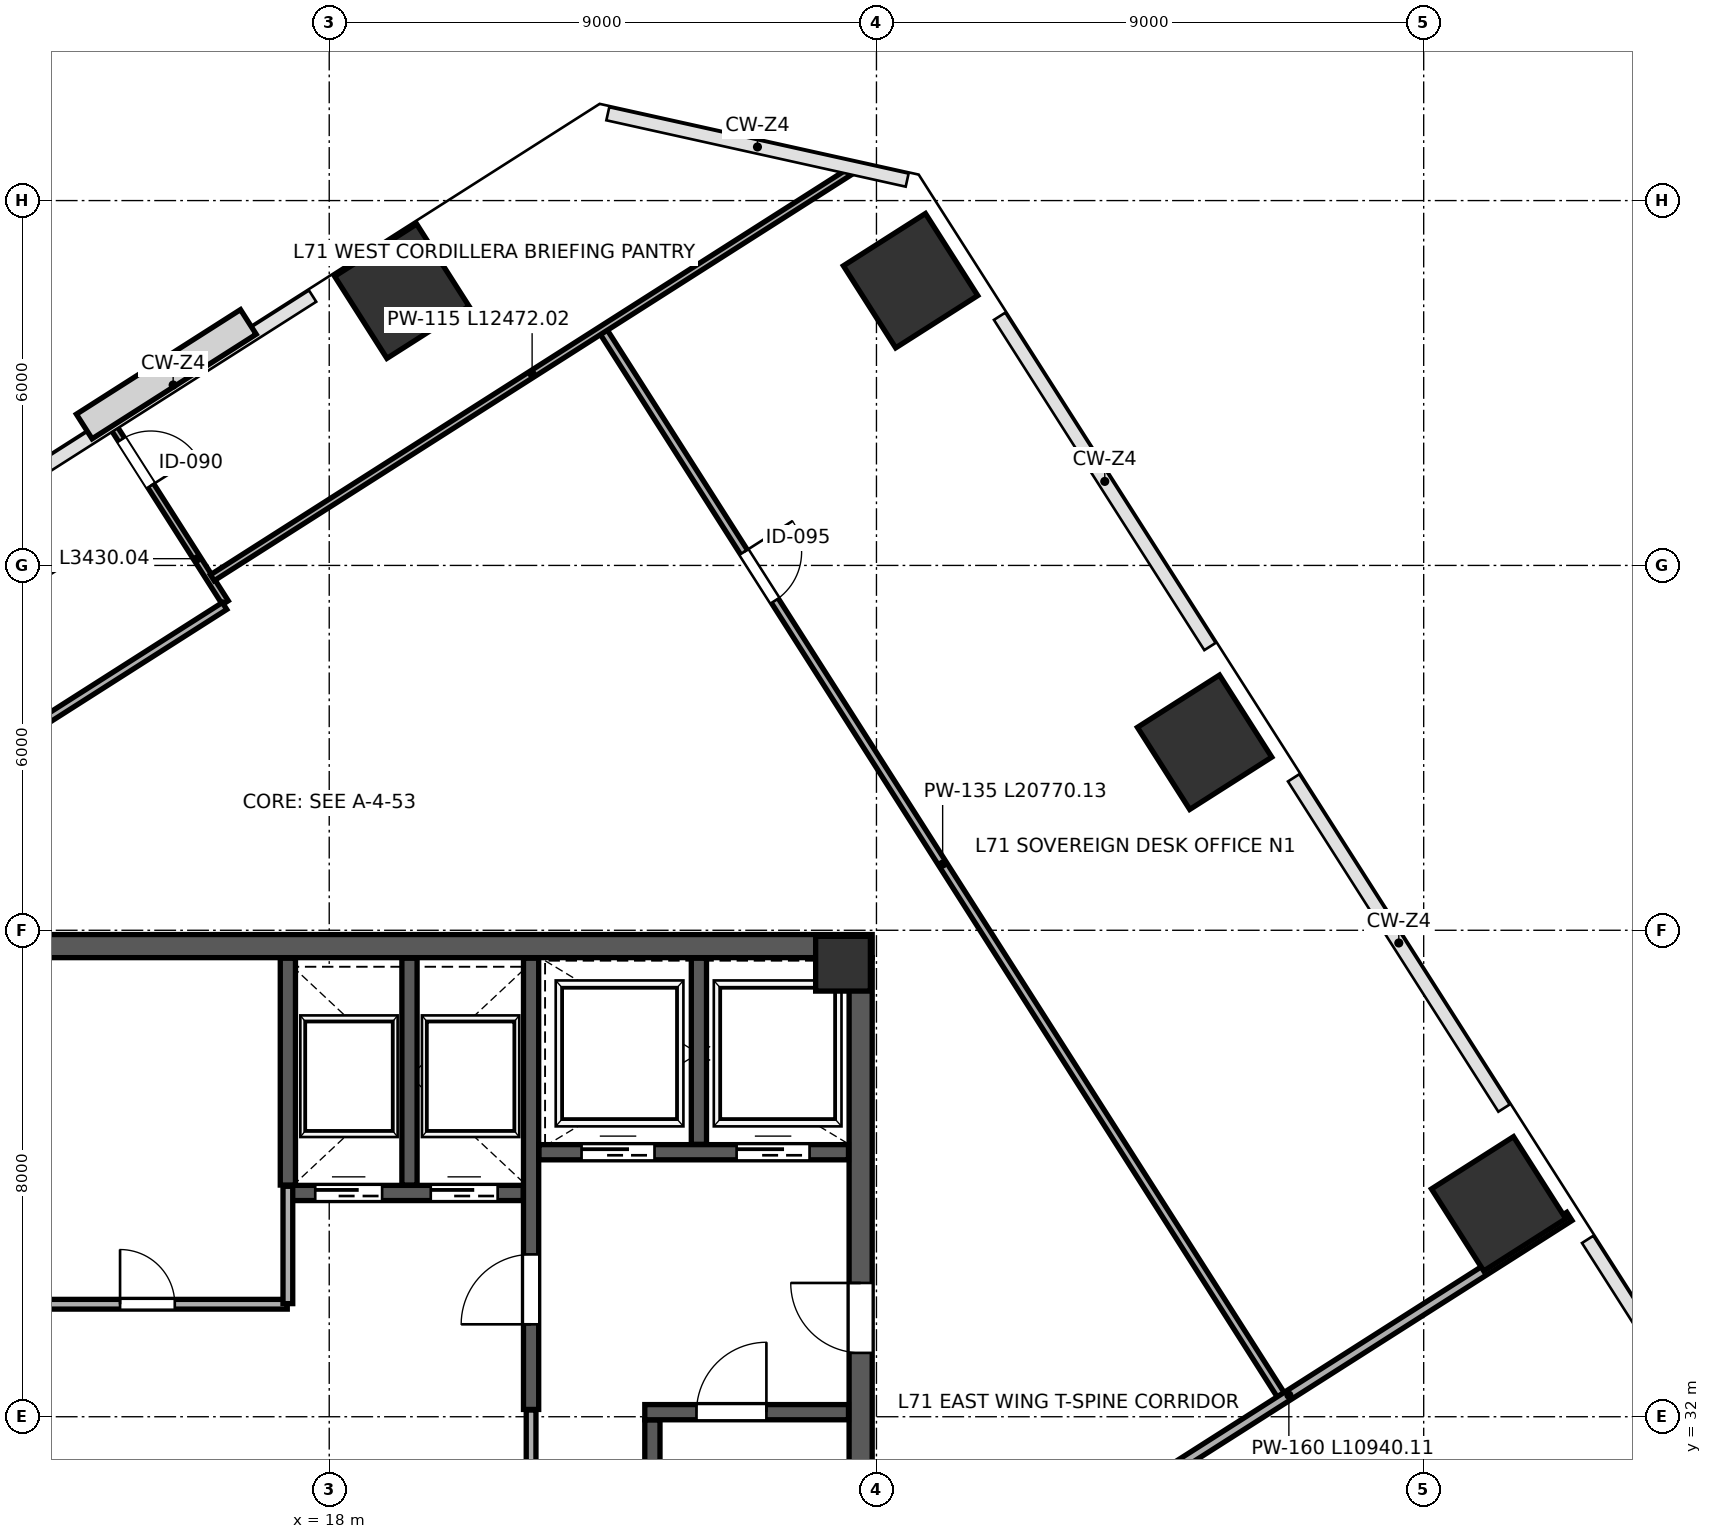
"""IFC4 building model, lengths in metres.
Left out: names, types, materials, properties, quantities, classifications, styles, units other than length and angle.
Written with IfcOpenShell. Run it as: python <this file> out.ifc"""

import sys

from ifc_helpers import new_model, si_unit, direction, frame, frame_2d, origin, origin_2d, place, context, subcontext, project, spatial, rectangle, extrude, source, transform, mapped, element, fill, save


model = new_model("IFC4")
c1 = context("Model", 3, precision=1e-05, world=origin(), true_north=direction((0.0, 1.0)))
c2 = subcontext(c1, "Body", "Model", "MODEL_VIEW")
j1 = project(units=[si_unit("LENGTHUNIT", "METRE"), si_unit("PLANEANGLEUNIT", "RADIAN")], contexts=[c1])
p1 = place(None, origin())
s1 = spatial("IfcSite", under=j1, at=p1, CompositionType="ELEMENT")
p2 = place(p1, origin())
s2 = spatial("IfcBuilding", under=s1, at=p2, CompositionType="ELEMENT")
p3 = place(p2, frame((0.0, 0.0, 315.6)))
s3 = spatial("IfcBuildingStorey", under=s2, at=p3, CompositionType="ELEMENT", Elevation=315.6)
m1 = source(origin(), c2, "Body", "SweptSolid", [
    extrude(rectangle(XDim=0.9, YDim=0.9, at=origin_2d()), origin(), (0.0, 0.0, 1.0), 4.198),
])
p4 = place(p3, frame((26.45, 39.45, 0.001), z_axis=(0.0, 0.0, 1.0), x_axis=(1.0, 0.0, 0.0)))
e1 = element("IfcColumn", 1, at=p4, inside=s3, PredefinedType="COLUMN", context=c2, shape_type="MappedRepresentation", body=[
    mapped(m1, transform((0.0, 0.0, 0.0), scale=1.0)),
])
m2 = source(origin(), c2, "Body", "SweptSolid", [
    extrude(rectangle(XDim=1.6, YDim=1.6, at=origin_2d()), origin(), (0.0, 0.0, 1.0), 4.198),
])
for number, where, z_axis, x_axis in (
    (2, (27.561, 50.683, 0.001), (0.0, 0.0, 1.0), (-0.537, 0.843, 0.0)),
    (3, (32.397, 43.092, 0.001), (0.0, 0.0, 1.0), (-0.537, 0.843, 0.0)),
    (4, (37.232, 35.501, 0.001), (0.0, 0.0, 1.0), (-0.537, 0.843, 0.0)),
    (5, (12.447, 46.211, 0.001), (0.0, 0.0, 1.0), (-0.537, 0.843, 0.0)),
    (6, (19.194, 50.51, 0.001), (0.0, 0.0, 1.0), (-0.537, 0.843, 0.0)),
):
    element("IfcColumn", number, at=place(p3, frame(where, z_axis=z_axis, x_axis=x_axis)), inside=s3, PredefinedType="COLUMN", context=c2, shape_type="MappedRepresentation", body=[
        mapped(m2, transform((0.0, 0.0, 0.0), scale=1.0)),
    ])
p5 = place(p3, frame((26.74, 24.45, 0.0), z_axis=(0.0, 0.0, 1.0), x_axis=(0.0, 1.0, 0.0)))
e7 = element("IfcWall", 7, at=p5, inside=s3, PredefinedType="SHEAR", context=c2, shape_type="SweptSolid", body=[
    extrude(rectangle(XDim=15.1, YDim=0.38, at=frame_2d((7.55, 0.0))), origin(), (0.0, 0.0, 1.0), 3.96),
])
p6 = place(p5, frame((8.6, 0.0, 0.0)))
e8 = element("IfcOpeningElement", 8, at=p6, cuts=e7, PredefinedType="OPENING", context=c2, shape_type="SweptSolid", body=[
    extrude(rectangle(XDim=1.15, YDim=2.2, at=frame_2d((0.575, 1.1))), frame((0.0, 0.2, 0.0), z_axis=(0.0, -1.0, 0.0), x_axis=(1.0, 0.0, 0.0)), (0.0, 0.0, 1.0), 0.4),
])
p7 = place(p3, frame((9.07, 39.74, 0.0), z_axis=(0.0, 0.0, 1.0), x_axis=(1.0, 0.0, 0.0)))
e9 = element("IfcWall", 9, at=p7, inside=s3, PredefinedType="SHEAR", context=c2, shape_type="SweptSolid", body=[
    extrude(rectangle(XDim=17.86, YDim=0.38, at=frame_2d((8.93, 0.0))), origin(), (0.0, 0.0, 1.0), 3.96),
])
p8 = place(p3, frame((23.315, 24.46, 0.0), z_axis=(0.0, 0.0, 1.0), x_axis=(0.0, 1.0, 0.0)))
e10 = element("IfcWall", 10, at=p8, inside=s3, PredefinedType="SHEAR", context=c2, shape_type="SweptSolid", body=[
    extrude(rectangle(XDim=7.49, YDim=0.25, at=frame_2d((3.745, 0.0))), origin(), (0.0, 0.0, 1.0), 3.96),
])
p9 = place(p3, frame((23.19, 32.075, 0.0), z_axis=(0.0, 0.0, 1.0), x_axis=(1.0, 0.0, 0.0)))
e11 = element("IfcWall", 11, at=p9, inside=s3, PredefinedType="SHEAR", context=c2, shape_type="SweptSolid", body=[
    extrude(rectangle(XDim=3.35, YDim=0.25, at=frame_2d((1.675, 0.0))), origin(), (0.0, 0.0, 1.0), 3.96),
])
p10 = place(p9, frame((0.85, 0.0, 0.0)))
e12 = element("IfcOpeningElement", 12, at=p10, cuts=e11, PredefinedType="OPENING", context=c2, shape_type="SweptSolid", body=[
    extrude(rectangle(XDim=1.15, YDim=2.2, at=frame_2d((0.575, 1.1))), frame((0.0, 0.135, 0.0), z_axis=(0.0, -1.0, 0.0), x_axis=(1.0, 0.0, 0.0)), (0.0, 0.0, 1.0), 0.27),
])
p11 = place(p3, frame((21.32, 32.12, 0.0), z_axis=(0.0, 0.0, 1.0), x_axis=(0.0, 1.0, 0.0)))
e13 = element("IfcWall", 13, at=p11, inside=s3, PredefinedType="SHEAR", context=c2, shape_type="SweptSolid", body=[
    extrude(rectangle(XDim=7.42, YDim=0.25, at=frame_2d((3.71, 0.0))), origin(), (0.0, 0.0, 1.0), 3.96),
])
p12 = place(p11, frame((1.4, 0.0, 0.0)))
e14 = element("IfcOpeningElement", 14, at=p12, cuts=e13, PredefinedType="OPENING", context=c2, shape_type="SweptSolid", body=[
    extrude(rectangle(XDim=1.15, YDim=2.2, at=frame_2d((0.575, 1.1))), frame((0.0, 0.135, 0.0), z_axis=(0.0, -1.0, 0.0), x_axis=(1.0, 0.0, 0.0)), (0.0, 0.0, 1.0), 0.27),
])
p13 = place(p3, frame((21.45, 36.35, 0.0), z_axis=(0.0, 0.0, 1.0), x_axis=(1.0, 0.0, 0.0)))
e15 = element("IfcWall", 15, at=p13, inside=s3, PredefinedType="SHEAR", context=c2, shape_type="SweptSolid", body=[
    extrude(rectangle(XDim=5.09, YDim=0.25, at=frame_2d((2.545, 0.0))), origin(), (0.0, 0.0, 1.0), 3.96),
])
p14 = place(p13, frame((0.7, 0.0, 0.0)))
e16 = element("IfcOpeningElement", 16, at=p14, cuts=e15, PredefinedType="OPENING", context=c2, shape_type="SweptSolid", body=[
    extrude(rectangle(XDim=1.2, YDim=2.2, at=frame_2d((0.6, 1.1))), frame((0.0, 0.135, 0.0), z_axis=(0.0, -1.0, 0.0), x_axis=(1.0, 0.0, 0.0)), (0.0, 0.0, 1.0), 0.27),
])
p15 = place(p13, frame((3.25, 0.0, 0.0)))
e17 = element("IfcOpeningElement", 17, at=p15, cuts=e15, PredefinedType="OPENING", context=c2, shape_type="SweptSolid", body=[
    extrude(rectangle(XDim=1.2, YDim=2.2, at=frame_2d((0.6, 1.1))), frame((0.0, 0.135, 0.0), z_axis=(0.0, -1.0, 0.0), x_axis=(1.0, 0.0, 0.0)), (0.0, 0.0, 1.0), 0.27),
])
p16 = place(p3, frame((24.08, 36.48, 0.0), z_axis=(0.0, 0.0, 1.0), x_axis=(0.0, 1.0, 0.0)))
e18 = element("IfcWall", 18, at=p16, inside=s3, PredefinedType="SHEAR", context=c2, shape_type="SweptSolid", body=[
    extrude(rectangle(XDim=3.06, YDim=0.25, at=frame_2d((1.53, 0.0))), origin(), (0.0, 0.0, 1.0), 3.96),
])
p17 = place(p3, frame((17.32, 35.68, 0.0), z_axis=(0.0, 0.0, 1.0), x_axis=(1.0, 0.0, 0.0)))
e19 = element("IfcWall", 19, at=p17, inside=s3, PredefinedType="SHEAR", context=c2, shape_type="SweptSolid", body=[
    extrude(rectangle(XDim=3.87, YDim=0.25, at=frame_2d((1.935, 0.0))), origin(), (0.0, 0.0, 1.0), 3.96),
])
p18 = place(p17, frame((0.45, 0.0, 0.0)))
e20 = element("IfcOpeningElement", 20, at=p18, cuts=e19, PredefinedType="OPENING", context=c2, shape_type="SweptSolid", body=[
    extrude(rectangle(XDim=1.1, YDim=2.2, at=frame_2d((0.55, 1.1))), frame((0.0, 0.135, 0.0), z_axis=(0.0, -1.0, 0.0), x_axis=(1.0, 0.0, 0.0)), (0.0, 0.0, 1.0), 0.27),
])
p19 = place(p17, frame((2.35, 0.0, 0.0)))
e21 = element("IfcOpeningElement", 21, at=p19, cuts=e19, PredefinedType="OPENING", context=c2, shape_type="SweptSolid", body=[
    extrude(rectangle(XDim=1.1, YDim=2.2, at=frame_2d((0.55, 1.1))), frame((0.0, 0.135, 0.0), z_axis=(0.0, -1.0, 0.0), x_axis=(1.0, 0.0, 0.0)), (0.0, 0.0, 1.0), 0.27),
])
for number, where, z_axis, x_axis in (
    (22, (17.32, 35.81, 0.0), (0.0, 0.0, 1.0), (0.0, 1.0, 0.0)),
    (23, (19.32, 35.81, 0.0), (0.0, 0.0, 1.0), (0.0, 1.0, 0.0)),
):
    element("IfcWall", number, at=place(p3, frame(where, z_axis=z_axis, x_axis=x_axis)), inside=s3, PredefinedType="SHEAR", context=c2, shape_type="SweptSolid", body=[
        extrude(rectangle(XDim=3.73, YDim=0.25, at=frame_2d((1.865, 0.0))), origin(), (0.0, 0.0, 1.0), 3.96),
    ])
p20 = place(p3, frame((13.21, 33.85, 0.0), z_axis=(0.0, 0.0, 1.0), x_axis=(1.0, 0.0, 0.0)))
e24 = element("IfcWall", 24, at=p20, inside=s3, PredefinedType="PARTITIONING", context=c2, shape_type="SweptSolid", body=[
    extrude(rectangle(XDim=4.1, YDim=0.16, at=frame_2d((2.05, 0.0))), origin(), (0.0, 0.0, 1.0), 3.96),
])
p21 = place(p20, frame((1.35, 0.0, 0.0)))
e25 = element("IfcOpeningElement", 25, at=p21, cuts=e24, PredefinedType="OPENING", context=c2, shape_type="SweptSolid", body=[
    extrude(rectangle(XDim=0.9, YDim=2.15, at=frame_2d((0.45, 1.075))), frame((0.0, 0.09, 0.0), z_axis=(0.0, -1.0, 0.0), x_axis=(1.0, 0.0, 0.0)), (0.0, 0.0, 1.0), 0.18),
])
p22 = place(p3, frame((17.32, 33.86, 0.0), z_axis=(0.0, 0.0, 1.0), x_axis=(0.0, 1.0, 0.0)))
e26 = element("IfcWall", 26, at=p22, inside=s3, PredefinedType="PARTITIONING", context=c2, shape_type="SweptSolid", body=[
    extrude(rectangle(XDim=1.93, YDim=0.16, at=frame_2d((0.965, 0.0))), origin(), (0.0, 0.0, 1.0), 3.96),
])
p23 = place(p3, frame((21.32, 29.19, 0.0), z_axis=(0.0, 0.0, 1.0), x_axis=(0.0, 1.0, 0.0)))
e27 = element("IfcWall", 27, at=p23, inside=s3, PredefinedType="PARTITIONING", context=c2, shape_type="SweptSolid", body=[
    extrude(rectangle(XDim=2.92, YDim=0.16, at=frame_2d((1.46, 0.0))), origin(), (0.0, 0.0, 1.0), 3.96),
])
p24 = place(p3, frame((22.509, 49.847, 0.0), z_axis=(0.0, 0.0, 1.0), x_axis=(0.537290700932, -0.843397120396, 0.0)))
e28 = element("IfcWall", 28, at=p24, inside=s3, PredefinedType="PARTITIONING", context=c2, shape_type="SweptSolid", body=[
    extrude(rectangle(XDim=20.77, YDim=0.135, at=frame_2d((10.385, 0.0))), origin(), (0.0, 0.0, 1.0), 3.96),
])
p25 = place(p24, frame((4.3, 0.0, 0.0)))
e29 = element("IfcOpeningElement", 29, at=p25, cuts=e28, PredefinedType="OPENING", context=c2, shape_type="SweptSolid", body=[
    extrude(rectangle(XDim=0.95, YDim=2.15, at=frame_2d((0.475, 1.075))), frame((0.0, 0.078, 0.0), z_axis=(0.0, -1.0, 0.0), x_axis=(1.0, 0.0, 0.0)), (0.0, 0.0, 1.0), 0.155),
])
p26 = place(p3, frame((14.448, 48.281, 0.0), z_axis=(0.0, 0.0, 1.0), x_axis=(0.537285301829, -0.843400559899, 0.0)))
e30 = element("IfcWall", 30, at=p26, inside=s3, PredefinedType="PARTITIONING", context=c2, shape_type="SweptSolid", body=[
    extrude(rectangle(XDim=3.43, YDim=0.115, at=frame_2d((1.715, 0.0))), origin(), (0.0, 0.0, 1.0), 3.295),
])
p27 = place(p26, frame((0.25, 0.0, 0.0)))
e31 = element("IfcOpeningElement", 31, at=p27, cuts=e30, PredefinedType="OPENING", context=c2, shape_type="SweptSolid", body=[
    extrude(rectangle(XDim=0.9, YDim=2.15, at=frame_2d((0.45, 1.075))), frame((0.0, 0.067, 0.0), z_axis=(0.0, -1.0, 0.0), x_axis=(1.0, 0.0, 0.0)), (0.0, 0.0, 1.0), 0.135),
])
p28 = place(p3, frame((1.798, 36.107, 0.0), z_axis=(0.0, 0.0, 1.0), x_axis=(0.843396745572, 0.537291289301, 0.0)))
e32 = element("IfcWall", 32, at=p28, inside=s3, PredefinedType="PARTITIONING", context=c2, shape_type="SweptSolid", body=[
    extrude(rectangle(XDim=17.17, YDim=0.135, at=frame_2d((8.585, 0.0))), origin(), (0.0, 0.0, 1.0), 3.96),
])
p29 = place(p3, frame((16.077, 45.797, 0.0), z_axis=(0.0, 0.0, 1.0), x_axis=(0.843392973199, 0.537297210824, 0.0)))
e33 = element("IfcWall", 33, at=p29, inside=s3, PredefinedType="PARTITIONING", context=c2, shape_type="SweptSolid", body=[
    extrude(rectangle(XDim=12.472, YDim=0.115, at=frame_2d((6.236, 0.0))), origin(), (0.0, 0.0, 1.0), 3.96),
])
p30 = place(p3, frame((29.169, 29.416, 0.0), z_axis=(0.0, 0.0, 1.0), x_axis=(0.843389386546, 0.537302840734, 0.0)))
e34 = element("IfcWall", 34, at=p30, inside=s3, PredefinedType="PARTITIONING", context=c2, shape_type="SweptSolid", body=[
    extrude(rectangle(XDim=10.94, YDim=0.16, at=frame_2d((5.47, 0.0))), origin(), (0.0, 0.0, 1.0), 3.96),
])
m3 = source(origin(), c2, "Body", "SweptSolid", [
    extrude(rectangle(XDim=1.15, YDim=2.2, at=frame_2d((0.575, 1.1))), frame((0.0, 0.025, 0.0), z_axis=(0.0, -1.0, 0.0), x_axis=(1.0, 0.0, 0.0)), (0.0, 0.0, 1.0), 0.05),
])
p31 = place(p12, origin())
e35 = element("IfcDoor", 35, at=p31, inside=s3, OperationType="SINGLE_SWING_LEFT", PredefinedType="DOOR", context=c2, shape_type="MappedRepresentation", body=[
    mapped(m3, transform((0.0, 0.0, 0.0), scale=1.0)),
])
fill(e14, e35)
m4 = source(origin(), c2, "Body", "SweptSolid", [
    extrude(rectangle(XDim=1.15, YDim=2.2, at=frame_2d((0.575, 1.1))), frame((0.0, 0.025, 0.0), z_axis=(0.0, -1.0, 0.0), x_axis=(1.0, 0.0, 0.0)), (0.0, 0.0, 1.0), 0.05),
])
p32 = place(p10, origin())
e36 = element("IfcDoor", 36, at=p32, inside=s3, OperationType="SINGLE_SWING_RIGHT", PredefinedType="DOOR", context=c2, shape_type="MappedRepresentation", body=[
    mapped(m4, transform((0.0, 0.0, 0.0), scale=1.0)),
])
fill(e12, e36)
p33 = place(p6, origin())
e37 = element("IfcDoor", 37, at=p33, inside=s3, OperationType="SINGLE_SWING_RIGHT", PredefinedType="DOOR", context=c2, shape_type="MappedRepresentation", body=[
    mapped(m3, transform((0.0, 0.0, 0.0), scale=1.0)),
])
fill(e8, e37)
m5 = source(origin(), c2, "Body", "SweptSolid", [
    extrude(rectangle(XDim=1.1, YDim=2.2, at=frame_2d((0.55, 1.1))), frame((0.0, 0.025, 0.0), z_axis=(0.0, -1.0, 0.0), x_axis=(1.0, 0.0, 0.0)), (0.0, 0.0, 1.0), 0.05),
])
p34 = place(p18, origin())
e38 = element("IfcDoor", 38, at=p34, inside=s3, OperationType="SLIDING_TO_LEFT", PredefinedType="DOOR", context=c2, shape_type="MappedRepresentation", body=[
    mapped(m5, transform((0.0, 0.0, 0.0), scale=1.0)),
])
fill(e20, e38)
p35 = place(p19, origin())
e39 = element("IfcDoor", 39, at=p35, inside=s3, OperationType="SLIDING_TO_RIGHT", PredefinedType="DOOR", context=c2, shape_type="MappedRepresentation", body=[
    mapped(m5, transform((0.0, 0.0, 0.0), scale=1.0)),
])
fill(e21, e39)
m6 = source(origin(), c2, "Body", "SweptSolid", [
    extrude(rectangle(XDim=1.2, YDim=2.2, at=frame_2d((0.6, 1.1))), frame((0.0, 0.025, 0.0), z_axis=(0.0, -1.0, 0.0), x_axis=(1.0, 0.0, 0.0)), (0.0, 0.0, 1.0), 0.05),
])
p36 = place(p14, origin())
e40 = element("IfcDoor", 40, at=p36, inside=s3, OperationType="SLIDING_TO_LEFT", PredefinedType="DOOR", context=c2, shape_type="MappedRepresentation", body=[
    mapped(m6, transform((0.0, 0.0, 0.0), scale=1.0)),
])
fill(e16, e40)
p37 = place(p15, origin())
e41 = element("IfcDoor", 41, at=p37, inside=s3, OperationType="SLIDING_TO_RIGHT", PredefinedType="DOOR", context=c2, shape_type="MappedRepresentation", body=[
    mapped(m6, transform((0.0, 0.0, 0.0), scale=1.0)),
])
fill(e17, e41)
m7 = source(origin(), c2, "Body", "SweptSolid", [
    extrude(rectangle(XDim=0.9, YDim=2.15, at=frame_2d((0.45, 1.075))), frame((0.0, 0.025, 0.0), z_axis=(0.0, -1.0, 0.0), x_axis=(1.0, 0.0, 0.0)), (0.0, 0.0, 1.0), 0.05),
])
p38 = place(p21, origin())
e42 = element("IfcDoor", 42, at=p38, inside=s3, OperationType="SINGLE_SWING_LEFT", PredefinedType="DOOR", context=c2, shape_type="MappedRepresentation", body=[
    mapped(m7, transform((0.0, 0.0, 0.0), scale=1.0)),
])
fill(e25, e42)
m8 = source(origin(), c2, "Body", "SweptSolid", [
    extrude(rectangle(XDim=0.95, YDim=2.15, at=frame_2d((0.475, 1.075))), frame((0.0, 0.025, 0.0), z_axis=(0.0, -1.0, 0.0), x_axis=(1.0, 0.0, 0.0)), (0.0, 0.0, 1.0), 0.05),
])
p39 = place(p25, origin())
e43 = element("IfcDoor", 43, at=p39, inside=s3, OperationType="SINGLE_SWING_LEFT", PredefinedType="DOOR", context=c2, shape_type="MappedRepresentation", body=[
    mapped(m8, transform((0.0, 0.0, 0.0), scale=1.0)),
])
fill(e29, e43)
m9 = source(origin(), c2, "Body", "SweptSolid", [
    extrude(rectangle(XDim=0.9, YDim=2.15, at=frame_2d((0.45, 1.075))), frame((0.0, 0.025, 0.0), z_axis=(0.0, -1.0, 0.0), x_axis=(1.0, 0.0, 0.0)), (0.0, 0.0, 1.0), 0.05),
])
p40 = place(p27, origin())
e44 = element("IfcDoor", 44, at=p40, inside=s3, OperationType="SINGLE_SWING_RIGHT", PredefinedType="DOOR", context=c2, shape_type="MappedRepresentation", body=[
    mapped(m9, transform((0.0, 0.0, 0.0), scale=1.0)),
])
fill(e31, e44)
save(model, sys.argv[1])
